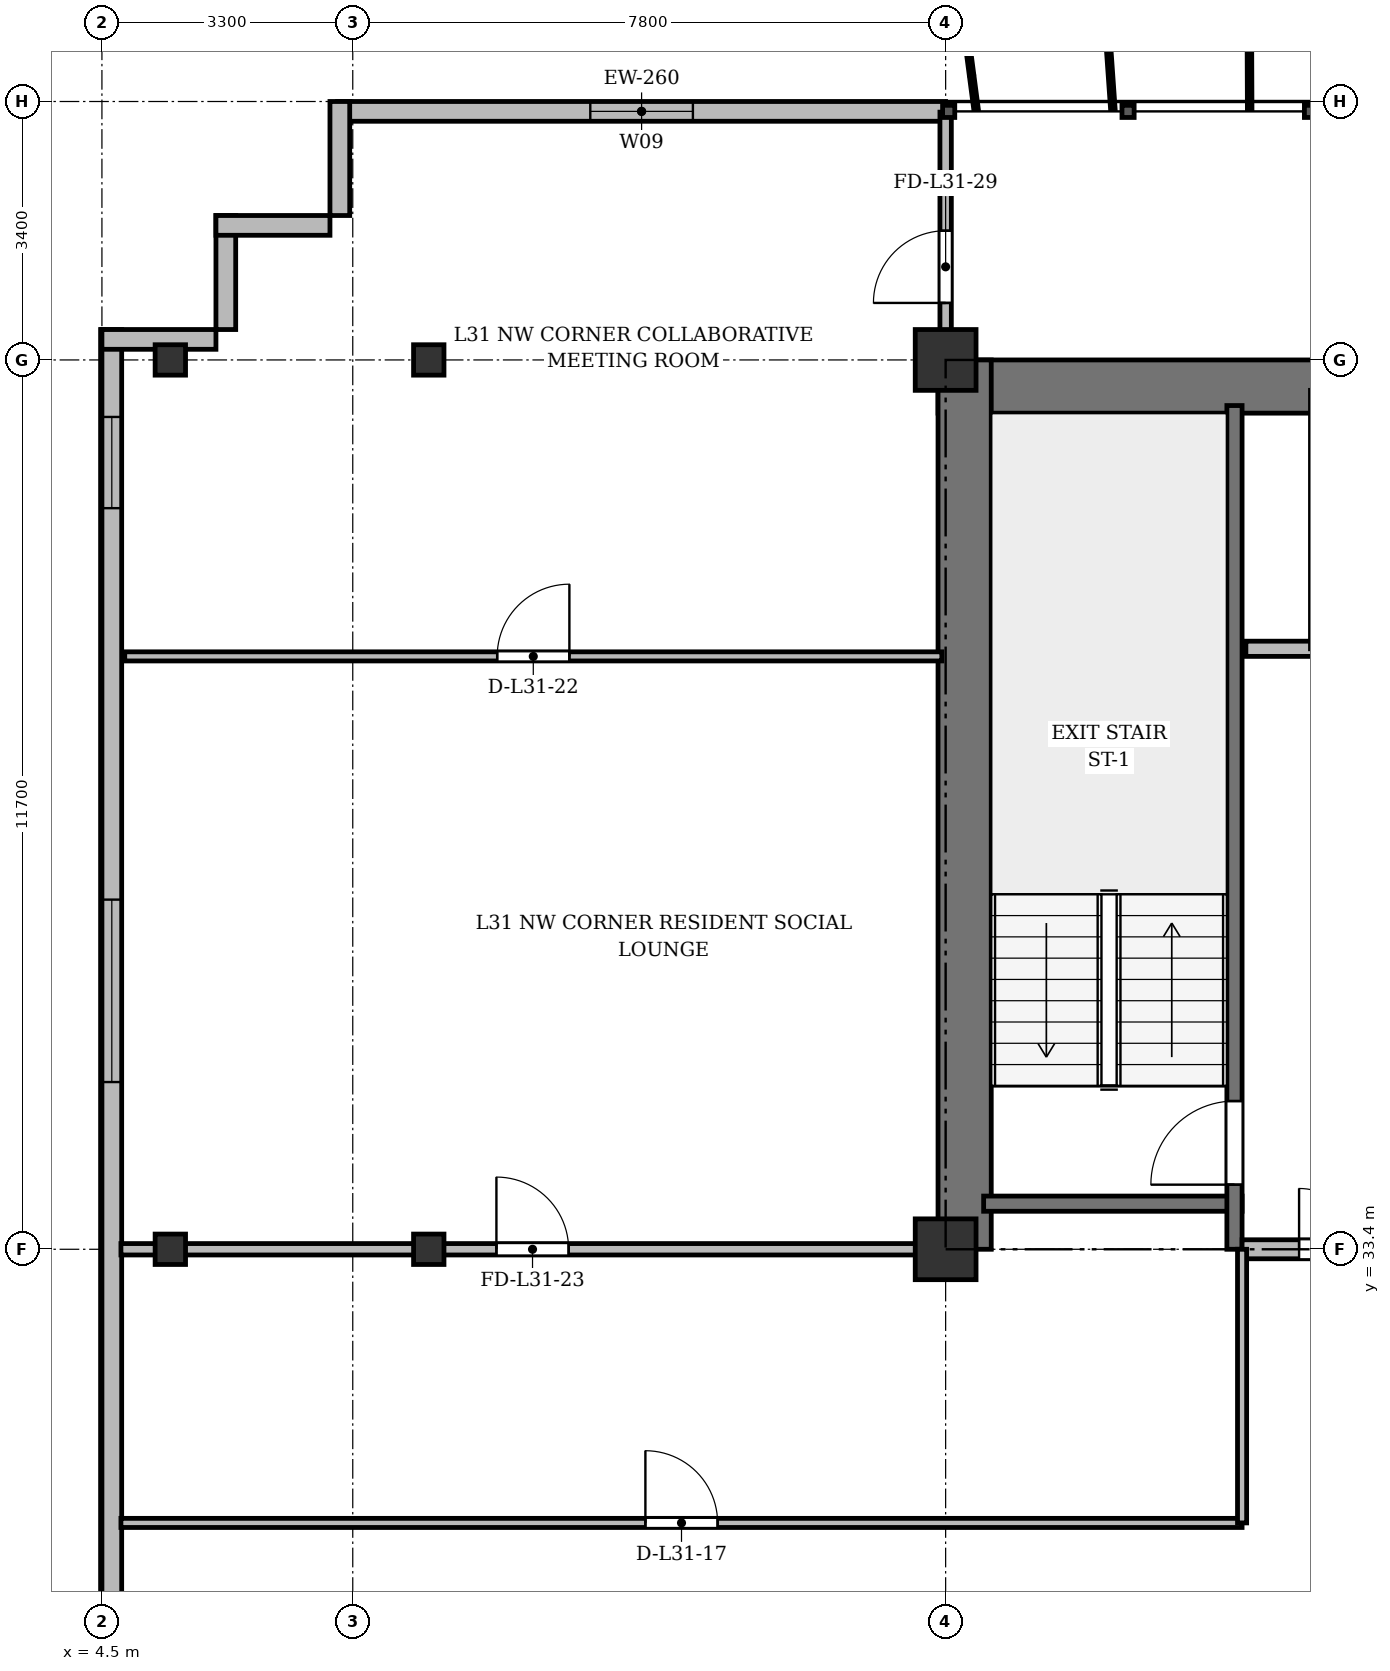
"""IFC4 building model, lengths in metres.
Left out: names, types, materials, properties, quantities, classifications, styles, units other than length and angle.
Written with IfcOpenShell. Run it as: python <this file> out.ifc"""

import sys

from ifc_helpers import new_model, si_unit, direction, frame, frame_2d, origin, origin_2d, place, context, subcontext, project, spatial, rectangle, i_section, extrude, source, transform, mapped, element, fill, save


model = new_model("IFC4")
c1 = context("Model", 3, precision=1e-05, world=origin(), true_north=direction((0.0, 1.0)))
c2 = subcontext(c1, "Body", "Model", "MODEL_VIEW")
j1 = project(units=[si_unit("LENGTHUNIT", "METRE"), si_unit("PLANEANGLEUNIT", "RADIAN")], contexts=[c1])
p1 = place(None, origin())
s1 = spatial("IfcSite", under=j1, at=p1, CompositionType="ELEMENT")
p2 = place(p1, origin())
s2 = spatial("IfcBuilding", under=s1, at=p2, CompositionType="ELEMENT")
p3 = place(p2, frame((0.0, 0.0, 121.3)))
s3 = spatial("IfcBuildingStorey", under=s2, at=p3, CompositionType="ELEMENT", Elevation=121.3)
m1 = source(origin(), c2, "Body", "SweptSolid", [
    extrude(i_section(OverallWidth=0.4, OverallDepth=0.4, WebThickness=0.022, FlangeThickness=0.035, at=origin_2d()), origin(), (0.0, 0.0, 1.0), 3.6),
])
for number, where, z_axis, x_axis in (
    (1, (5.4, 33.4, 0.0), (0.0, 0.0, 1.0), (1.0, 0.0, 0.0)),
    (2, (5.4, 45.1, 0.0), (0.0, 0.0, 1.0), (1.0, 0.0, 0.0)),
    (3, (8.8, 33.4, 0.0), (0.0, 0.0, 1.0), (1.0, 0.0, 0.0)),
    (4, (8.8, 45.1, 0.0), (0.0, 0.0, 1.0), (1.0, 0.0, 0.0)),
):
    element("IfcColumn", number, at=place(p3, frame(where, z_axis=z_axis, x_axis=x_axis)), inside=s3, PredefinedType="COLUMN", context=c2, shape_type="MappedRepresentation", body=[
        mapped(m1, transform((0.0, 0.0, 0.0), x_axis=(1.0, 0.0, 0.0), y_axis=(0.0, 1.0, 0.0), z_axis=(0.0, 0.0, 1.0), scale=1.0)),
    ])
m2 = source(origin(), c2, "Body", "SweptSolid", [
    extrude(rectangle(XDim=0.8, YDim=0.8, at=origin_2d()), origin(), (0.0, 0.0, 1.0), 3.6),
])
for number, where, z_axis, x_axis in (
    (5, (15.6, 33.4, 0.0), (0.0, 0.0, 1.0), (1.0, 0.0, 0.0)),
    (6, (15.6, 45.1, 0.0), (0.0, 0.0, 1.0), (1.0, 0.0, 0.0)),
):
    element("IfcColumn", number, at=place(p3, frame(where, z_axis=z_axis, x_axis=x_axis)), inside=s3, PredefinedType="COLUMN", context=c2, shape_type="MappedRepresentation", body=[
        mapped(m2, transform((0.0, 0.0, 0.0), x_axis=(1.0, 0.0, 0.0), y_axis=(0.0, 1.0, 0.0), z_axis=(0.0, 0.0, 1.0), scale=1.0)),
    ])
p4 = place(p3, frame((7.6, 48.37, 0.0), z_axis=(0.0, 0.0, 1.0), x_axis=(1.0, 0.0, 0.0)))
e7 = element("IfcWall", 7, at=p4, inside=s3, PredefinedType="SOLIDWALL", context=c2, shape_type="SweptSolid", body=[
    extrude(rectangle(XDim=8.0, YDim=0.26, at=frame_2d((4.0, 0.0))), origin(), (0.0, 0.0, 1.0), 3.34),
])
p5 = place(p4, frame((3.325, 0.0, 0.9)))
e8 = element("IfcOpeningElement", 8, at=p5, cuts=e7, PredefinedType="OPENING", context=c2, shape_type="SweptSolid", body=[
    extrude(rectangle(XDim=1.35, YDim=1.5, at=frame_2d((0.675, 0.75))), frame((0.0, 0.14, 0.0), z_axis=(0.0, -1.0, 0.0), x_axis=(1.0, 0.0, 0.0)), (0.0, 0.0, 1.0), 0.28),
])
p6 = place(p3, frame((4.63, 5.9, 0.0), z_axis=(0.0, 0.0, 1.0), x_axis=(0.0, 1.0, 0.0)))
e9 = element("IfcWall", 9, at=p6, inside=s3, PredefinedType="SOLIDWALL", context=c2, shape_type="SweptSolid", body=[
    extrude(rectangle(XDim=39.6, YDim=0.26, at=frame_2d((19.8, 0.0))), origin(), (0.0, 0.0, 1.0), 3.34),
])
p7 = place(p6, frame((1.45, 0.0, 0.92)))
e10 = element("IfcOpeningElement", 10, at=p7, cuts=e9, PredefinedType="OPENING", context=c2, shape_type="SweptSolid", body=[
    extrude(rectangle(XDim=1.2, YDim=1.65, at=frame_2d((0.6, 0.825))), frame((0.0, 0.14, 0.0), z_axis=(0.0, -1.0, 0.0), x_axis=(1.0, 0.0, 0.0)), (0.0, 0.0, 1.0), 0.28),
])
p8 = place(p6, frame((4.3, 0.0, 0.92)))
e11 = element("IfcOpeningElement", 11, at=p8, cuts=e9, PredefinedType="OPENING", context=c2, shape_type="SweptSolid", body=[
    extrude(rectangle(XDim=2.4, YDim=2.1, at=frame_2d((1.2, 1.05))), frame((0.0, 0.14, 0.0), z_axis=(0.0, -1.0, 0.0), x_axis=(1.0, 0.0, 0.0)), (0.0, 0.0, 1.0), 0.28),
])
p9 = place(p6, frame((8.5, 0.0, 0.92)))
e12 = element("IfcOpeningElement", 12, at=p9, cuts=e9, PredefinedType="OPENING", context=c2, shape_type="SweptSolid", body=[
    extrude(rectangle(XDim=2.4, YDim=2.1, at=frame_2d((1.2, 1.05))), frame((0.0, 0.14, 0.0), z_axis=(0.0, -1.0, 0.0), x_axis=(1.0, 0.0, 0.0)), (0.0, 0.0, 1.0), 0.28),
])
p10 = place(p6, frame((15.7, 0.0, 0.92)))
e13 = element("IfcOpeningElement", 13, at=p10, cuts=e9, PredefinedType="OPENING", context=c2, shape_type="SweptSolid", body=[
    extrude(rectangle(XDim=2.4, YDim=2.1, at=frame_2d((1.2, 1.05))), frame((0.0, 0.14, 0.0), z_axis=(0.0, -1.0, 0.0), x_axis=(1.0, 0.0, 0.0)), (0.0, 0.0, 1.0), 0.28),
])
p11 = place(p6, frame((29.7, 0.0, 0.92)))
e14 = element("IfcOpeningElement", 14, at=p11, cuts=e9, PredefinedType="OPENING", context=c2, shape_type="SweptSolid", body=[
    extrude(rectangle(XDim=2.4, YDim=2.1, at=frame_2d((1.2, 1.05))), frame((0.0, 0.14, 0.0), z_axis=(0.0, -1.0, 0.0), x_axis=(1.0, 0.0, 0.0)), (0.0, 0.0, 1.0), 0.28),
])
p12 = place(p6, frame((37.25, 0.0, 0.92)))
e15 = element("IfcOpeningElement", 15, at=p12, cuts=e9, PredefinedType="OPENING", context=c2, shape_type="SweptSolid", body=[
    extrude(rectangle(XDim=1.2, YDim=1.65, at=frame_2d((0.6, 0.825))), frame((0.0, 0.14, 0.0), z_axis=(0.0, -1.0, 0.0), x_axis=(1.0, 0.0, 0.0)), (0.0, 0.0, 1.0), 0.28),
])
p13 = place(p3, frame((4.5, 45.37, 0.0), z_axis=(0.0, 0.0, 1.0), x_axis=(1.0, 0.0, 0.0)))
e16 = element("IfcWall", 16, at=p13, inside=s3, PredefinedType="SOLIDWALL", context=c2, shape_type="SweptSolid", body=[
    extrude(rectangle(XDim=1.5, YDim=0.26, at=frame_2d((0.75, 0.0))), origin(), (0.0, 0.0, 1.0), 2.752),
])
for number, where, z_axis, x_axis in (
    (17, (6.13, 45.5, 0.0), (0.0, 0.0, 1.0), (0.0, 1.0, 0.0)),
    (18, (6.0, 46.87, 0.0), (0.0, 0.0, 1.0), (1.0, 0.0, 0.0)),
    (19, (7.63, 47.0, 0.0), (0.0, 0.0, 1.0), (0.0, 1.0, 0.0)),
):
    element("IfcWall", number, at=place(p3, frame(where, z_axis=z_axis, x_axis=x_axis)), inside=s3, PredefinedType="SOLIDWALL", context=c2, shape_type="SweptSolid", body=[
        extrude(rectangle(XDim=1.5, YDim=0.26, at=frame_2d((0.75, 0.0))), origin(), (0.0, 0.0, 1.0), 3.34),
    ])
p14 = place(p3, frame((15.5, 44.75, 0.0), z_axis=(0.0, 0.0, 1.0), x_axis=(1.0, 0.0, 0.0)))
e20 = element("IfcWall", 20, at=p14, inside=s3, PredefinedType="SHEAR", context=c2, shape_type="SweptSolid", body=[
    extrude(rectangle(XDim=43.4, YDim=0.7, at=frame_2d((21.7, 0.0))), origin(), (0.0, 0.0, 1.0), 3.34),
])
p15 = place(p3, frame((15.85, 33.4, 0.0), z_axis=(0.0, 0.0, 1.0), x_axis=(0.0, 1.0, 0.0)))
e21 = element("IfcWall", 21, at=p15, inside=s3, PredefinedType="SHEAR", context=c2, shape_type="SweptSolid", body=[
    extrude(rectangle(XDim=11.7, YDim=0.7, at=frame_2d((5.85, 0.0))), origin(), (0.0, 0.0, 1.0), 3.34),
])
p16 = place(p3, frame((16.1, 34.0, 0.0), z_axis=(0.0, 0.0, 1.0), x_axis=(1.0, 0.0, 0.0)))
e22 = element("IfcWall", 22, at=p16, inside=s3, PredefinedType="SHEAR", context=c2, shape_type="SweptSolid", body=[
    extrude(rectangle(XDim=3.4, YDim=0.2, at=frame_2d((1.7, 0.0))), origin(), (0.0, 0.0, 1.0), 3.34),
])
p17 = place(p3, frame((19.4, 33.4, 0.0), z_axis=(0.0, 0.0, 1.0), x_axis=(0.0, 1.0, 0.0)))
e23 = element("IfcWall", 23, at=p17, inside=s3, PredefinedType="SHEAR", context=c2, shape_type="SweptSolid", body=[
    extrude(rectangle(XDim=11.1, YDim=0.2, at=frame_2d((5.55, 0.0))), origin(), (0.0, 0.0, 1.0), 3.34),
])
p18 = place(p17, frame((0.85, 0.0, 0.0)))
e24 = element("IfcOpeningElement", 24, at=p18, cuts=e23, PredefinedType="OPENING", context=c2, shape_type="SweptSolid", body=[
    extrude(rectangle(XDim=1.1, YDim=2.15, at=frame_2d((0.55, 1.075))), frame((0.0, 0.11, 0.0), z_axis=(0.0, -1.0, 0.0), x_axis=(1.0, 0.0, 0.0)), (0.0, 0.0, 1.0), 0.22),
])
p19 = place(p3, frame((19.55, 41.3, 0.0), z_axis=(0.0, 0.0, 1.0), x_axis=(1.0, 0.0, 0.0)))
e25 = element("IfcWall", 25, at=p19, inside=s3, PredefinedType="SOLIDWALL", context=c2, shape_type="SweptSolid", body=[
    extrude(rectangle(XDim=6.75, YDim=0.2, at=frame_2d((3.375, 0.0))), origin(), (0.0, 0.0, 1.0), 3.34),
])
p20 = place(p19, frame((1.7, 0.0, 0.0)))
e26 = element("IfcOpeningElement", 26, at=p20, cuts=e25, PredefinedType="OPENING", context=c2, shape_type="SweptSolid", body=[
    extrude(rectangle(XDim=1.1, YDim=2.15, at=frame_2d((0.55, 1.075))), frame((0.0, 0.11, 0.0), z_axis=(0.0, -1.0, 0.0), x_axis=(1.0, 0.0, 0.0)), (0.0, 0.0, 1.0), 0.22),
])
p21 = place(p19, frame((4.4, 0.0, 0.0)))
e27 = element("IfcOpeningElement", 27, at=p21, cuts=e25, PredefinedType="OPENING", context=c2, shape_type="SweptSolid", body=[
    extrude(rectangle(XDim=1.1, YDim=2.15, at=frame_2d((0.55, 1.075))), frame((0.0, 0.11, 0.0), z_axis=(0.0, -1.0, 0.0), x_axis=(1.0, 0.0, 0.0)), (0.0, 0.0, 1.0), 0.22),
])
p22 = place(p3, frame((19.5, 33.4, 0.0), z_axis=(0.0, 0.0, 1.0), x_axis=(1.0, 0.0, 0.0)))
e28 = element("IfcWall", 28, at=p22, inside=s3, PredefinedType="PARTITIONING", context=c2, shape_type="SweptSolid", body=[
    extrude(rectangle(XDim=6.8, YDim=0.25, at=frame_2d((3.4, 0.0))), origin(), (0.0, 0.0, 1.0), 2.752),
])
p23 = place(p22, frame((0.75, 0.0, 0.0)))
e29 = element("IfcOpeningElement", 29, at=p23, cuts=e28, PredefinedType="OPENING", context=c2, shape_type="SweptSolid", body=[
    extrude(rectangle(XDim=1.6, YDim=2.2, at=frame_2d((0.8, 1.1))), frame((0.0, 0.135, 0.0), z_axis=(0.0, -1.0, 0.0), x_axis=(1.0, 0.0, 0.0)), (0.0, 0.0, 1.0), 0.27),
])
p24 = place(p3, frame((4.75, 29.8, 0.0), z_axis=(0.0, 0.0, 1.0), x_axis=(1.0, 0.0, 0.0)))
e30 = element("IfcWall", 30, at=p24, inside=s3, PredefinedType="PARTITIONING", context=c2, shape_type="SweptSolid", body=[
    extrude(rectangle(XDim=14.75, YDim=0.12, at=frame_2d((7.375, 0.0))), origin(), (0.0, 0.0, 1.0), 2.84),
])
p25 = place(p24, frame((6.9, 0.0, 0.0)))
e31 = element("IfcOpeningElement", 31, at=p25, cuts=e30, PredefinedType="OPENING", context=c2, shape_type="SweptSolid", body=[
    extrude(rectangle(XDim=0.95, YDim=2.15, at=frame_2d((0.475, 1.075))), frame((0.0, 0.07, 0.0), z_axis=(0.0, -1.0, 0.0), x_axis=(1.0, 0.0, 0.0)), (0.0, 0.0, 1.0), 0.14),
])
p26 = place(p3, frame((19.5, 29.8, 0.0), z_axis=(0.0, 0.0, 1.0), x_axis=(0.0, 1.0, 0.0)))
e32 = element("IfcWall", 32, at=p26, inside=s3, PredefinedType="PARTITIONING", context=c2, shape_type="SweptSolid", body=[
    extrude(rectangle(XDim=3.6, YDim=0.12, at=frame_2d((1.8, 0.0))), origin(), (0.0, 0.0, 1.0), 2.752),
])
p27 = place(p3, frame((4.8, 41.2, 0.0), z_axis=(0.0, 0.0, 1.0), x_axis=(1.0, 0.0, 0.0)))
e33 = element("IfcWall", 33, at=p27, inside=s3, PredefinedType="PARTITIONING", context=c2, shape_type="SweptSolid", body=[
    extrude(rectangle(XDim=10.75, YDim=0.12, at=frame_2d((5.375, 0.0))), origin(), (0.0, 0.0, 1.0), 2.84),
])
p28 = place(p27, frame((4.9, 0.0, 0.0)))
e34 = element("IfcOpeningElement", 34, at=p28, cuts=e33, PredefinedType="OPENING", context=c2, shape_type="SweptSolid", body=[
    extrude(rectangle(XDim=0.95, YDim=2.15, at=frame_2d((0.475, 1.075))), frame((0.0, 0.07, 0.0), z_axis=(0.0, -1.0, 0.0), x_axis=(1.0, 0.0, 0.0)), (0.0, 0.0, 1.0), 0.14),
])
p29 = place(p3, frame((4.75, 33.4, 0.0), z_axis=(0.0, 0.0, 1.0), x_axis=(1.0, 0.0, 0.0)))
e35 = element("IfcWall", 35, at=p29, inside=s3, PredefinedType="PARTITIONING", context=c2, shape_type="SweptSolid", body=[
    extrude(rectangle(XDim=10.85, YDim=0.15, at=frame_2d((5.425, 0.0))), origin(), (0.0, 0.0, 1.0), 2.752),
])
p30 = place(p29, frame((4.94, 0.0, 0.0)))
e36 = element("IfcOpeningElement", 36, at=p30, cuts=e35, PredefinedType="OPENING", context=c2, shape_type="SweptSolid", body=[
    extrude(rectangle(XDim=0.95, YDim=2.15, at=frame_2d((0.475, 1.075))), frame((0.0, 0.085, 0.0), z_axis=(0.0, -1.0, 0.0), x_axis=(1.0, 0.0, 0.0)), (0.0, 0.0, 1.0), 0.17),
])
p31 = place(p3, frame((15.6, 44.75, 0.0), z_axis=(0.0, 0.0, 1.0), x_axis=(0.0, 1.0, 0.0)))
e37 = element("IfcWall", 37, at=p31, inside=s3, PredefinedType="PARTITIONING", context=c2, shape_type="SweptSolid", body=[
    extrude(rectangle(XDim=3.61, YDim=0.15, at=frame_2d((1.805, 0.0))), origin(), (0.0, 0.0, 1.0), 2.84),
])
p32 = place(p31, frame((1.1, 0.0, 0.0)))
e38 = element("IfcOpeningElement", 38, at=p32, cuts=e37, PredefinedType="OPENING", context=c2, shape_type="SweptSolid", body=[
    extrude(rectangle(XDim=0.95, YDim=2.15, at=frame_2d((0.475, 1.075))), frame((0.0, 0.085, 0.0), z_axis=(0.0, -1.0, 0.0), x_axis=(1.0, 0.0, 0.0)), (0.0, 0.0, 1.0), 0.17),
])
m3 = source(origin(), c2, "Body", "SweptSolid", [
    extrude(rectangle(XDim=1.35, YDim=1.5, at=frame_2d((0.675, 0.75))), frame((0.0, 0.03, 0.0), z_axis=(0.0, -1.0, 0.0), x_axis=(1.0, 0.0, 0.0)), (0.0, 0.0, 1.0), 0.06),
])
p33 = place(p5, origin())
e39 = element("IfcWindow", 39, at=p33, inside=s3, PartitioningType="SINGLE_PANEL", PredefinedType="WINDOW", context=c2, shape_type="MappedRepresentation", body=[
    mapped(m3, transform((0.0, 0.0, 0.0), x_axis=(1.0, 0.0, 0.0), y_axis=(0.0, 1.0, 0.0), z_axis=(0.0, 0.0, 1.0), scale=1.0)),
])
fill(e8, e39)
m4 = source(origin(), c2, "Body", "SweptSolid", [
    extrude(rectangle(XDim=2.4, YDim=2.1, at=frame_2d((1.2, 1.05))), frame((0.0, 0.03, 0.0), z_axis=(0.0, -1.0, 0.0), x_axis=(1.0, 0.0, 0.0)), (0.0, 0.0, 1.0), 0.06),
])
p34 = place(p11, origin())
e40 = element("IfcWindow", 40, at=p34, inside=s3, PartitioningType="SINGLE_PANEL", PredefinedType="WINDOW", context=c2, shape_type="MappedRepresentation", body=[
    mapped(m4, transform((0.0, 0.0, 0.0), x_axis=(1.0, 0.0, 0.0), y_axis=(0.0, 1.0, 0.0), z_axis=(0.0, 0.0, 1.0), scale=1.0)),
])
fill(e14, e40)
m5 = source(origin(), c2, "Body", "SweptSolid", [
    extrude(rectangle(XDim=1.2, YDim=1.65, at=frame_2d((0.6, 0.825))), frame((0.0, 0.03, 0.0), z_axis=(0.0, -1.0, 0.0), x_axis=(1.0, 0.0, 0.0)), (0.0, 0.0, 1.0), 0.06),
])
p35 = place(p12, origin())
e41 = element("IfcWindow", 41, at=p35, inside=s3, PartitioningType="SINGLE_PANEL", PredefinedType="WINDOW", context=c2, shape_type="MappedRepresentation", body=[
    mapped(m5, transform((0.0, 0.0, 0.0), x_axis=(1.0, 0.0, 0.0), y_axis=(0.0, 1.0, 0.0), z_axis=(0.0, 0.0, 1.0), scale=1.0)),
])
fill(e15, e41)
m6 = source(origin(), c2, "Body", "SweptSolid", [
    extrude(rectangle(XDim=1.1, YDim=2.15, at=frame_2d((0.55, 1.075))), frame((0.0, 0.025, 0.0), z_axis=(0.0, -1.0, 0.0), x_axis=(1.0, 0.0, 0.0)), (0.0, 0.0, 1.0), 0.05),
])
p36 = place(p18, origin())
e42 = element("IfcDoor", 42, at=p36, inside=s3, OperationType="SINGLE_SWING_LEFT", PredefinedType="DOOR", context=c2, shape_type="MappedRepresentation", body=[
    mapped(m6, transform((0.0, 0.0, 0.0), x_axis=(1.0, 0.0, 0.0), y_axis=(0.0, 1.0, 0.0), z_axis=(0.0, 0.0, 1.0), scale=1.0)),
])
fill(e24, e42)
m7 = source(origin(), c2, "Body", "SweptSolid", [
    extrude(rectangle(XDim=1.6, YDim=2.2, at=frame_2d((0.8, 1.1))), frame((0.0, 0.025, 0.0), z_axis=(0.0, -1.0, 0.0), x_axis=(1.0, 0.0, 0.0)), (0.0, 0.0, 1.0), 0.05),
])
p37 = place(p23, origin())
e43 = element("IfcDoor", 43, at=p37, inside=s3, OperationType="DOUBLE_DOOR_SINGLE_SWING", PredefinedType="DOOR", context=c2, shape_type="MappedRepresentation", body=[
    mapped(m7, transform((0.0, 0.0, 0.0), x_axis=(1.0, 0.0, 0.0), y_axis=(0.0, 1.0, 0.0), z_axis=(0.0, 0.0, 1.0), scale=1.0)),
])
fill(e29, e43)
m8 = source(origin(), c2, "Body", "SweptSolid", [
    extrude(rectangle(XDim=0.95, YDim=2.15, at=frame_2d((0.475, 1.075))), frame((0.0, 0.025, 0.0), z_axis=(0.0, -1.0, 0.0), x_axis=(1.0, 0.0, 0.0)), (0.0, 0.0, 1.0), 0.05),
])
p38 = place(p25, origin())
e44 = element("IfcDoor", 44, at=p38, inside=s3, OperationType="SINGLE_SWING_LEFT", PredefinedType="DOOR", context=c2, shape_type="MappedRepresentation", body=[
    mapped(m8, transform((0.0, 0.0, 0.0), x_axis=(1.0, 0.0, 0.0), y_axis=(0.0, 1.0, 0.0), z_axis=(0.0, 0.0, 1.0), scale=1.0)),
])
fill(e31, e44)
p39 = place(p28, origin())
e45 = element("IfcDoor", 45, at=p39, inside=s3, OperationType="SINGLE_SWING_RIGHT", PredefinedType="DOOR", context=c2, shape_type="MappedRepresentation", body=[
    mapped(m8, transform((0.0, 0.0, 0.0), x_axis=(1.0, 0.0, 0.0), y_axis=(0.0, 1.0, 0.0), z_axis=(0.0, 0.0, 1.0), scale=1.0)),
])
fill(e34, e45)
p40 = place(p30, origin())
e46 = element("IfcDoor", 46, at=p40, inside=s3, OperationType="SINGLE_SWING_LEFT", PredefinedType="DOOR", context=c2, shape_type="MappedRepresentation", body=[
    mapped(m8, transform((0.0, 0.0, 0.0), x_axis=(1.0, 0.0, 0.0), y_axis=(0.0, 1.0, 0.0), z_axis=(0.0, 0.0, 1.0), scale=1.0)),
])
fill(e36, e46)
p41 = place(p32, origin())
e47 = element("IfcDoor", 47, at=p41, inside=s3, OperationType="SINGLE_SWING_LEFT", PredefinedType="DOOR", context=c2, shape_type="MappedRepresentation", body=[
    mapped(m8, transform((0.0, 0.0, 0.0), x_axis=(1.0, 0.0, 0.0), y_axis=(0.0, 1.0, 0.0), z_axis=(0.0, 0.0, 1.0), scale=1.0)),
])
fill(e38, e47)
save(model, sys.argv[1])
